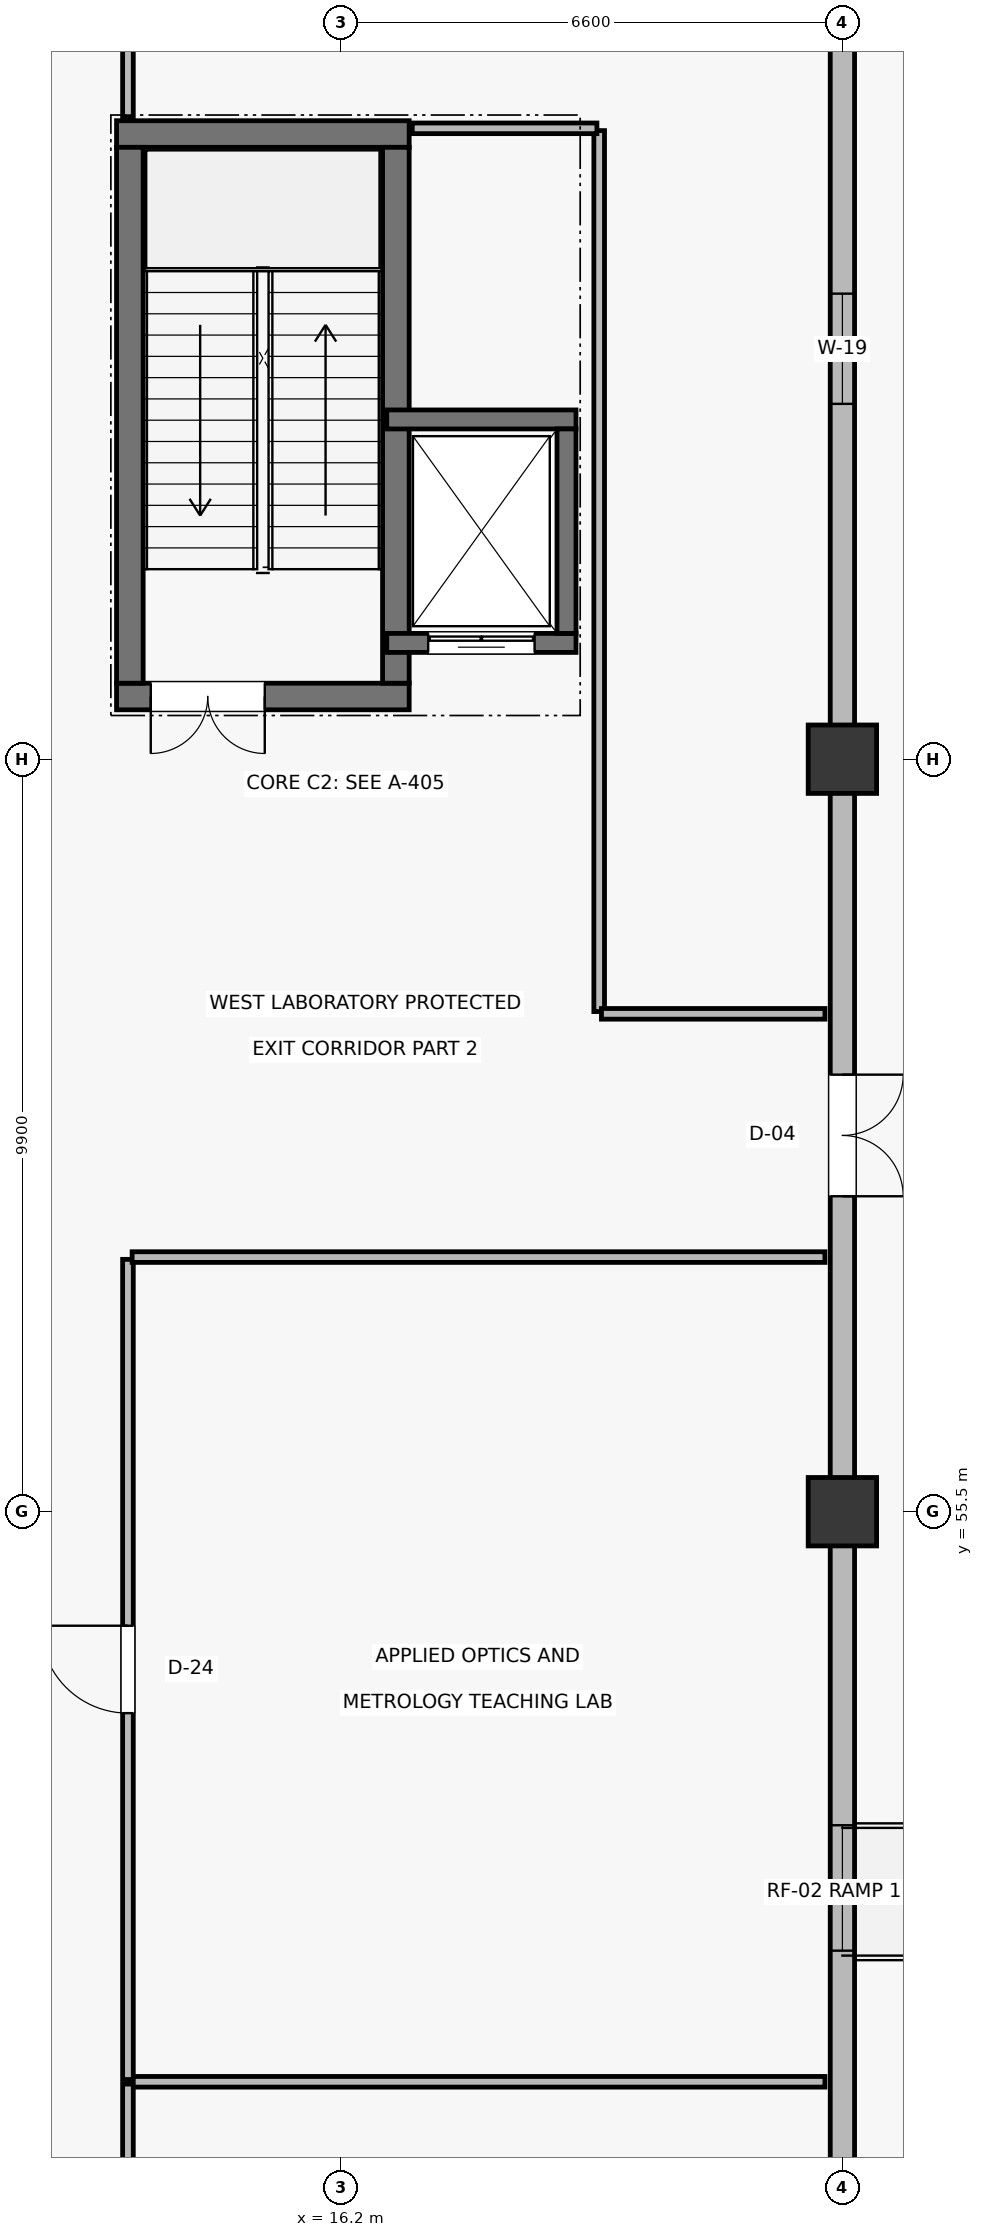
"""IFC4 building model, lengths in metres.
Left out: names, types, materials, properties, quantities, classifications, styles, units other than length and angle.
Written with IfcOpenShell. Run it as: python <this file> out.ifc"""

import sys

from ifc_helpers import new_model, si_unit, direction, frame, frame_2d, origin, origin_2d, place, context, subcontext, project, spatial, rectangle, extrude, element, fill, save


model = new_model("IFC4")
c1 = context("Model", 3, precision=1e-05, world=origin(), true_north=direction((0.0, 1.0)))
c2 = subcontext(c1, "Body", "Model", "MODEL_VIEW")
j1 = project(units=[si_unit("LENGTHUNIT", "METRE"), si_unit("PLANEANGLEUNIT", "RADIAN")], contexts=[c1])
p1 = place(None, origin())
s1 = spatial("IfcSite", under=j1, at=p1, CompositionType="ELEMENT")
p2 = place(p1, origin())
s2 = spatial("IfcBuilding", under=s1, at=p2, CompositionType="ELEMENT")
p3 = place(p2, origin())
s3 = spatial("IfcBuildingStorey", under=s2, at=p3, CompositionType="ELEMENT", Elevation=0.0)
for number, where, z_axis, x_axis in (
    (1, (22.8, 55.5, 0.0), (0.0, 0.0, 1.0), (1.0, 0.0, 0.0)),
    (2, (22.8, 65.4, 0.0), (0.0, 0.0, 1.0), (1.0, 0.0, 0.0)),
):
    element("IfcColumn", number, at=place(p3, frame(where, z_axis=z_axis, x_axis=x_axis)), inside=s3, PredefinedType="COLUMN", context=c2, shape_type="SweptSolid", body=[
        extrude(rectangle(XDim=0.9, YDim=0.9, at=origin_2d()), origin(), (0.0, 0.0, 1.0), 5.4),
    ])
p4 = place(p3, frame((22.8, 46.035, 0.0), z_axis=(0.0, 0.0, 1.0), x_axis=(0.0, 1.0, 0.0)))
e3 = element("IfcWall", 3, at=p4, inside=s3, PredefinedType="SOLIDWALL", context=c2, shape_type="SweptSolid", body=[
    extrude(rectangle(XDim=9.03, YDim=0.32, at=frame_2d((4.515, 0.0))), origin(), (0.0, 0.0, 1.0), 4.225),
])
p5 = place(p4, frame((3.69, 0.0, 0.9)))
e4 = element("IfcOpeningElement", 4, at=p5, cuts=e3, PredefinedType="OPENING", context=c2, shape_type="SweptSolid", body=[
    extrude(rectangle(XDim=1.65, YDim=1.65, at=frame_2d((0.825, 0.825))), frame((0.0, 0.17, 0.0), z_axis=(0.0, -1.0, 0.0), x_axis=(1.0, 0.0, 0.0)), (0.0, 0.0, 1.0), 0.34),
])
p6 = place(p3, frame((22.8, 55.935, 0.0), z_axis=(0.0, 0.0, 1.0), x_axis=(0.0, 1.0, 0.0)))
e5 = element("IfcWall", 5, at=p6, inside=s3, PredefinedType="SOLIDWALL", context=c2, shape_type="SweptSolid", body=[
    extrude(rectangle(XDim=9.03, YDim=0.32, at=frame_2d((4.515, 0.0))), origin(), (0.0, 0.0, 1.0), 4.225),
])
p7 = place(p6, frame((3.715, 0.0, 0.0)))
e6 = element("IfcOpeningElement", 6, at=p7, cuts=e5, PredefinedType="OPENING", context=c2, shape_type="SweptSolid", body=[
    extrude(rectangle(XDim=1.6, YDim=2.25, at=frame_2d((0.8, 1.125))), frame((0.0, 0.17, 0.0), z_axis=(0.0, -1.0, 0.0), x_axis=(1.0, 0.0, 0.0)), (0.0, 0.0, 1.0), 0.34),
])
p8 = place(p3, frame((22.8, 65.835, 0.0), z_axis=(0.0, 0.0, 1.0), x_axis=(0.0, 1.0, 0.0)))
e7 = element("IfcWall", 7, at=p8, inside=s3, PredefinedType="SOLIDWALL", context=c2, shape_type="SweptSolid", body=[
    extrude(rectangle(XDim=9.93, YDim=0.32, at=frame_2d((4.965, 0.0))), origin(), (0.0, 0.0, 1.0), 4.225),
])
p9 = place(p8, frame((4.24, 0.0, 0.9)))
e8 = element("IfcOpeningElement", 8, at=p9, cuts=e7, PredefinedType="OPENING", context=c2, shape_type="SweptSolid", body=[
    extrude(rectangle(XDim=1.45, YDim=1.5, at=frame_2d((0.725, 0.75))), frame((0.0, 0.17, 0.0), z_axis=(0.0, -1.0, 0.0), x_axis=(1.0, 0.0, 0.0)), (0.0, 0.0, 1.0), 0.34),
])
p10 = place(p3, frame((13.25, 66.225, 0.0), z_axis=(0.0, 0.0, 1.0), x_axis=(1.0, 0.0, 0.0)))
e9 = element("IfcWall", 9, at=p10, inside=s3, PredefinedType="SHEAR", context=c2, shape_type="SweptSolid", body=[
    extrude(rectangle(XDim=3.85, YDim=0.35, at=frame_2d((1.925, 0.0))), origin(), (0.0, 0.0, 1.0), 5.18),
])
p11 = place(p10, frame((0.45, 0.0, 0.0)))
e10 = element("IfcOpeningElement", 10, at=p11, cuts=e9, PredefinedType="OPENING", context=c2, shape_type="SweptSolid", body=[
    extrude(rectangle(XDim=1.5, YDim=2.2, at=frame_2d((0.75, 1.1))), frame((0.0, 0.185, 0.0), z_axis=(0.0, -1.0, 0.0), x_axis=(1.0, 0.0, 0.0)), (0.0, 0.0, 1.0), 0.37),
])
p12 = place(p3, frame((13.25, 73.625, 0.0), z_axis=(0.0, 0.0, 1.0), x_axis=(1.0, 0.0, 0.0)))
e11 = element("IfcWall", 11, at=p12, inside=s3, PredefinedType="SHEAR", context=c2, shape_type="SweptSolid", body=[
    extrude(rectangle(XDim=3.85, YDim=0.35, at=frame_2d((1.925, 0.0))), origin(), (0.0, 0.0, 1.0), 5.18),
])
for number, where, z_axis, x_axis in (
    (12, (13.425, 66.4, 0.0), (0.0, 0.0, 1.0), (0.0, 1.0, 0.0)),
    (13, (16.925, 66.4, 0.0), (0.0, 0.0, 1.0), (0.0, 1.0, 0.0)),
):
    element("IfcWall", number, at=place(p3, frame(where, z_axis=z_axis, x_axis=x_axis)), inside=s3, PredefinedType="SHEAR", context=c2, shape_type="SweptSolid", body=[
        extrude(rectangle(XDim=7.05, YDim=0.35, at=frame_2d((3.525, 0.0))), origin(), (0.0, 0.0, 1.0), 5.18),
    ])
p13 = place(p3, frame((16.805, 66.93, 0.0), z_axis=(0.0, 0.0, 1.0), x_axis=(1.0, 0.0, 0.0)))
e14 = element("IfcWall", 14, at=p13, inside=s3, PredefinedType="SHEAR", context=c2, shape_type="SweptSolid", body=[
    extrude(rectangle(XDim=2.49, YDim=0.25, at=frame_2d((1.245, 0.0))), origin(), (0.0, 0.0, 1.0), 5.16),
])
p14 = place(p13, frame((0.545, 0.0, 0.0)))
e15 = element("IfcOpeningElement", 15, at=p14, cuts=e14, PredefinedType="OPENING", context=c2, shape_type="SweptSolid", body=[
    extrude(rectangle(XDim=1.4, YDim=2.3, at=frame_2d((0.7, 1.15))), frame((0.0, 0.135, 0.0), z_axis=(0.0, -1.0, 0.0), x_axis=(1.0, 0.0, 0.0)), (0.0, 0.0, 1.0), 0.27),
])
p15 = place(p3, frame((16.805, 69.87, 0.0), z_axis=(0.0, 0.0, 1.0), x_axis=(1.0, 0.0, 0.0)))
e16 = element("IfcWall", 16, at=p15, inside=s3, PredefinedType="SHEAR", context=c2, shape_type="SweptSolid", body=[
    extrude(rectangle(XDim=2.49, YDim=0.25, at=frame_2d((1.245, 0.0))), origin(), (0.0, 0.0, 1.0), 5.16),
])
p16 = place(p3, frame((19.17, 67.055, 0.0), z_axis=(0.0, 0.0, 1.0), x_axis=(0.0, 1.0, 0.0)))
e17 = element("IfcWall", 17, at=p16, inside=s3, PredefinedType="SHEAR", context=c2, shape_type="SweptSolid", body=[
    extrude(rectangle(XDim=2.69, YDim=0.25, at=frame_2d((1.345, 0.0))), origin(), (0.0, 0.0, 1.0), 5.16),
])
p17 = place(p3, frame((13.43, 48.0, 0.0), z_axis=(0.0, 0.0, 1.0), x_axis=(1.0, 0.0, 0.0)))
e18 = element("IfcWall", 18, at=p17, inside=s3, PredefinedType="PARTITIONING", context=c2, shape_type="SweptSolid", body=[
    extrude(rectangle(XDim=9.14, YDim=0.14, at=frame_2d((4.57, 0.0))), origin(), (0.0, 0.0, 1.0), 4.225),
])
p18 = place(p3, frame((13.4, 30.03, 0.0), z_axis=(0.0, 0.0, 1.0), x_axis=(0.0, 1.0, 0.0)))
e19 = element("IfcWall", 19, at=p18, inside=s3, PredefinedType="PARTITIONING", context=c2, shape_type="SweptSolid", body=[
    extrude(rectangle(XDim=17.94, YDim=0.14, at=frame_2d((8.97, 0.0))), origin(), (0.0, 0.0, 1.0), 4.115),
])
p19 = place(p18, frame((8.43, 0.0, 0.0)))
e20 = element("IfcOpeningElement", 20, at=p19, cuts=e19, PredefinedType="OPENING", context=c2, shape_type="SweptSolid", body=[
    extrude(rectangle(XDim=1.08, YDim=2.15, at=frame_2d((0.54, 1.075))), frame((0.0, 0.08, 0.0), z_axis=(0.0, -1.0, 0.0), x_axis=(1.0, 0.0, 0.0)), (0.0, 0.0, 1.0), 0.16),
])
p20 = place(p3, frame((13.4, 48.03, 0.0), z_axis=(0.0, 0.0, 1.0), x_axis=(0.0, 1.0, 0.0)))
e21 = element("IfcWall", 21, at=p20, inside=s3, PredefinedType="PARTITIONING", context=c2, shape_type="SweptSolid", body=[
    extrude(rectangle(XDim=10.79, YDim=0.14, at=frame_2d((5.395, 0.0))), origin(), (0.0, 0.0, 1.0), 4.275),
])
p21 = place(p20, frame((4.82, 0.0, 0.0)))
e22 = element("IfcOpeningElement", 22, at=p21, cuts=e21, PredefinedType="OPENING", context=c2, shape_type="SweptSolid", body=[
    extrude(rectangle(XDim=1.15, YDim=2.15, at=frame_2d((0.575, 1.075))), frame((0.0, 0.08, 0.0), z_axis=(0.0, -1.0, 0.0), x_axis=(1.0, 0.0, 0.0)), (0.0, 0.0, 1.0), 0.16),
])
p22 = place(p3, frame((13.455, 58.85, 0.0), z_axis=(0.0, 0.0, 1.0), x_axis=(1.0, 0.0, 0.0)))
e23 = element("IfcWall", 23, at=p22, inside=s3, PredefinedType="PARTITIONING", context=c2, shape_type="SweptSolid", body=[
    extrude(rectangle(XDim=9.115, YDim=0.14, at=frame_2d((4.558, 0.0))), origin(), (0.0, 0.0, 1.0), 4.225),
])
p23 = place(p3, frame((13.4, 73.853, 0.0), z_axis=(0.0, 0.0, 1.0), x_axis=(0.0, 1.0, 0.0)))
e24 = element("IfcWall", 24, at=p23, inside=s3, PredefinedType="PARTITIONING", context=c2, shape_type="SweptSolid", body=[
    extrude(rectangle(XDim=17.917, YDim=0.14, at=frame_2d((8.958, 0.0))), origin(), (0.0, 0.0, 1.0), 4.275),
])
p24 = place(p23, frame((8.383, 0.0, 0.0)))
e25 = element("IfcOpeningElement", 25, at=p24, cuts=e24, PredefinedType="OPENING", context=c2, shape_type="SweptSolid", body=[
    extrude(rectangle(XDim=1.15, YDim=2.15, at=frame_2d((0.575, 1.075))), frame((0.0, 0.08, 0.0), z_axis=(0.0, -1.0, 0.0), x_axis=(1.0, 0.0, 0.0)), (0.0, 0.0, 1.0), 0.16),
])
p25 = place(p3, frame((19.6, 62.08, 0.0), z_axis=(0.0, 0.0, 1.0), x_axis=(0.0, 1.0, 0.0)))
e26 = element("IfcWall", 26, at=p25, inside=s3, PredefinedType="PARTITIONING", context=c2, shape_type="SweptSolid", body=[
    extrude(rectangle(XDim=11.59, YDim=0.14, at=frame_2d((5.795, 0.0))), origin(), (0.0, 0.0, 1.0), 4.155),
])
p26 = place(p3, frame((17.14, 73.7, 0.0), z_axis=(0.0, 0.0, 1.0), x_axis=(1.0, 0.0, 0.0)))
e27 = element("IfcWall", 27, at=p26, inside=s3, PredefinedType="PARTITIONING", context=c2, shape_type="SweptSolid", body=[
    extrude(rectangle(XDim=2.43, YDim=0.14, at=frame_2d((1.215, 0.0))), origin(), (0.0, 0.0, 1.0), 5.08),
])
p27 = place(p3, frame((19.63, 62.05, 0.0), z_axis=(0.0, 0.0, 1.0), x_axis=(1.0, 0.0, 0.0)))
e28 = element("IfcWall", 28, at=p27, inside=s3, PredefinedType="PARTITIONING", context=c2, shape_type="SweptSolid", body=[
    extrude(rectangle(XDim=2.94, YDim=0.14, at=frame_2d((1.47, 0.0))), origin(), (0.0, 0.0, 1.0), 4.225),
])
p28 = place(p5, frame((1.65, 0.0, 0.0), z_axis=(0.0, 0.0, 1.0), x_axis=(-1.0, 0.0, 0.0)))
e29 = element("IfcWindow", 29, at=p28, inside=s3, PartitioningType="SINGLE_PANEL", PredefinedType="WINDOW", context=c2, shape_type="SweptSolid", body=[
    extrude(rectangle(XDim=1.65, YDim=1.65, at=frame_2d((0.825, 0.825))), frame((0.0, 0.03, 0.0), z_axis=(0.0, -1.0, 0.0), x_axis=(1.0, 0.0, 0.0)), (0.0, 0.0, 1.0), 0.06),
])
fill(e4, e29)
p29 = place(p7, frame((1.6, 0.0, 0.0), z_axis=(0.0, 0.0, 1.0), x_axis=(-1.0, 0.0, 0.0)))
e30 = element("IfcDoor", 30, at=p29, inside=s3, OperationType="DOUBLE_DOOR_SINGLE_SWING", PredefinedType="DOOR", context=c2, shape_type="SweptSolid", body=[
    extrude(rectangle(XDim=1.6, YDim=2.25, at=frame_2d((0.8, 1.125))), frame((0.0, 0.025, 0.0), z_axis=(0.0, -1.0, 0.0), x_axis=(1.0, 0.0, 0.0)), (0.0, 0.0, 1.0), 0.05),
])
fill(e6, e30)
p30 = place(p9, frame((1.45, 0.0, 0.0), z_axis=(0.0, 0.0, 1.0), x_axis=(-1.0, 0.0, 0.0)))
e31 = element("IfcWindow", 31, at=p30, inside=s3, PartitioningType="SINGLE_PANEL", PredefinedType="WINDOW", context=c2, shape_type="SweptSolid", body=[
    extrude(rectangle(XDim=1.45, YDim=1.5, at=frame_2d((0.725, 0.75))), frame((0.0, 0.03, 0.0), z_axis=(0.0, -1.0, 0.0), x_axis=(1.0, 0.0, 0.0)), (0.0, 0.0, 1.0), 0.06),
])
fill(e8, e31)
p31 = place(p11, frame((1.5, 0.0, 0.0), z_axis=(0.0, 0.0, 1.0), x_axis=(-1.0, 0.0, 0.0)))
e32 = element("IfcDoor", 32, at=p31, inside=s3, OperationType="DOUBLE_DOOR_SINGLE_SWING", PredefinedType="DOOR", context=c2, shape_type="SweptSolid", body=[
    extrude(rectangle(XDim=1.5, YDim=2.2, at=frame_2d((0.75, 1.1))), frame((0.0, 0.025, 0.0), z_axis=(0.0, -1.0, 0.0), x_axis=(1.0, 0.0, 0.0)), (0.0, 0.0, 1.0), 0.05),
])
fill(e10, e32)
p32 = place(p14, frame((1.4, 0.0, 0.0), z_axis=(0.0, 0.0, 1.0), x_axis=(-1.0, 0.0, 0.0)))
e33 = element("IfcDoor", 33, at=p32, inside=s3, OperationType="DOUBLE_DOOR_SLIDING", PredefinedType="DOOR", context=c2, shape_type="SweptSolid", body=[
    extrude(rectangle(XDim=1.4, YDim=2.3, at=frame_2d((0.7, 1.15))), frame((0.0, 0.025, 0.0), z_axis=(0.0, -1.0, 0.0), x_axis=(1.0, 0.0, 0.0)), (0.0, 0.0, 1.0), 0.05),
])
fill(e15, e33)
p33 = place(p21, origin())
e34 = element("IfcDoor", 34, at=p33, inside=s3, OperationType="SINGLE_SWING_RIGHT", PredefinedType="DOOR", context=c2, shape_type="SweptSolid", body=[
    extrude(rectangle(XDim=1.15, YDim=2.15, at=frame_2d((0.575, 1.075))), frame((0.0, 0.025, 0.0), z_axis=(0.0, -1.0, 0.0), x_axis=(1.0, 0.0, 0.0)), (0.0, 0.0, 1.0), 0.05),
])
fill(e22, e34)
save(model, sys.argv[1])
